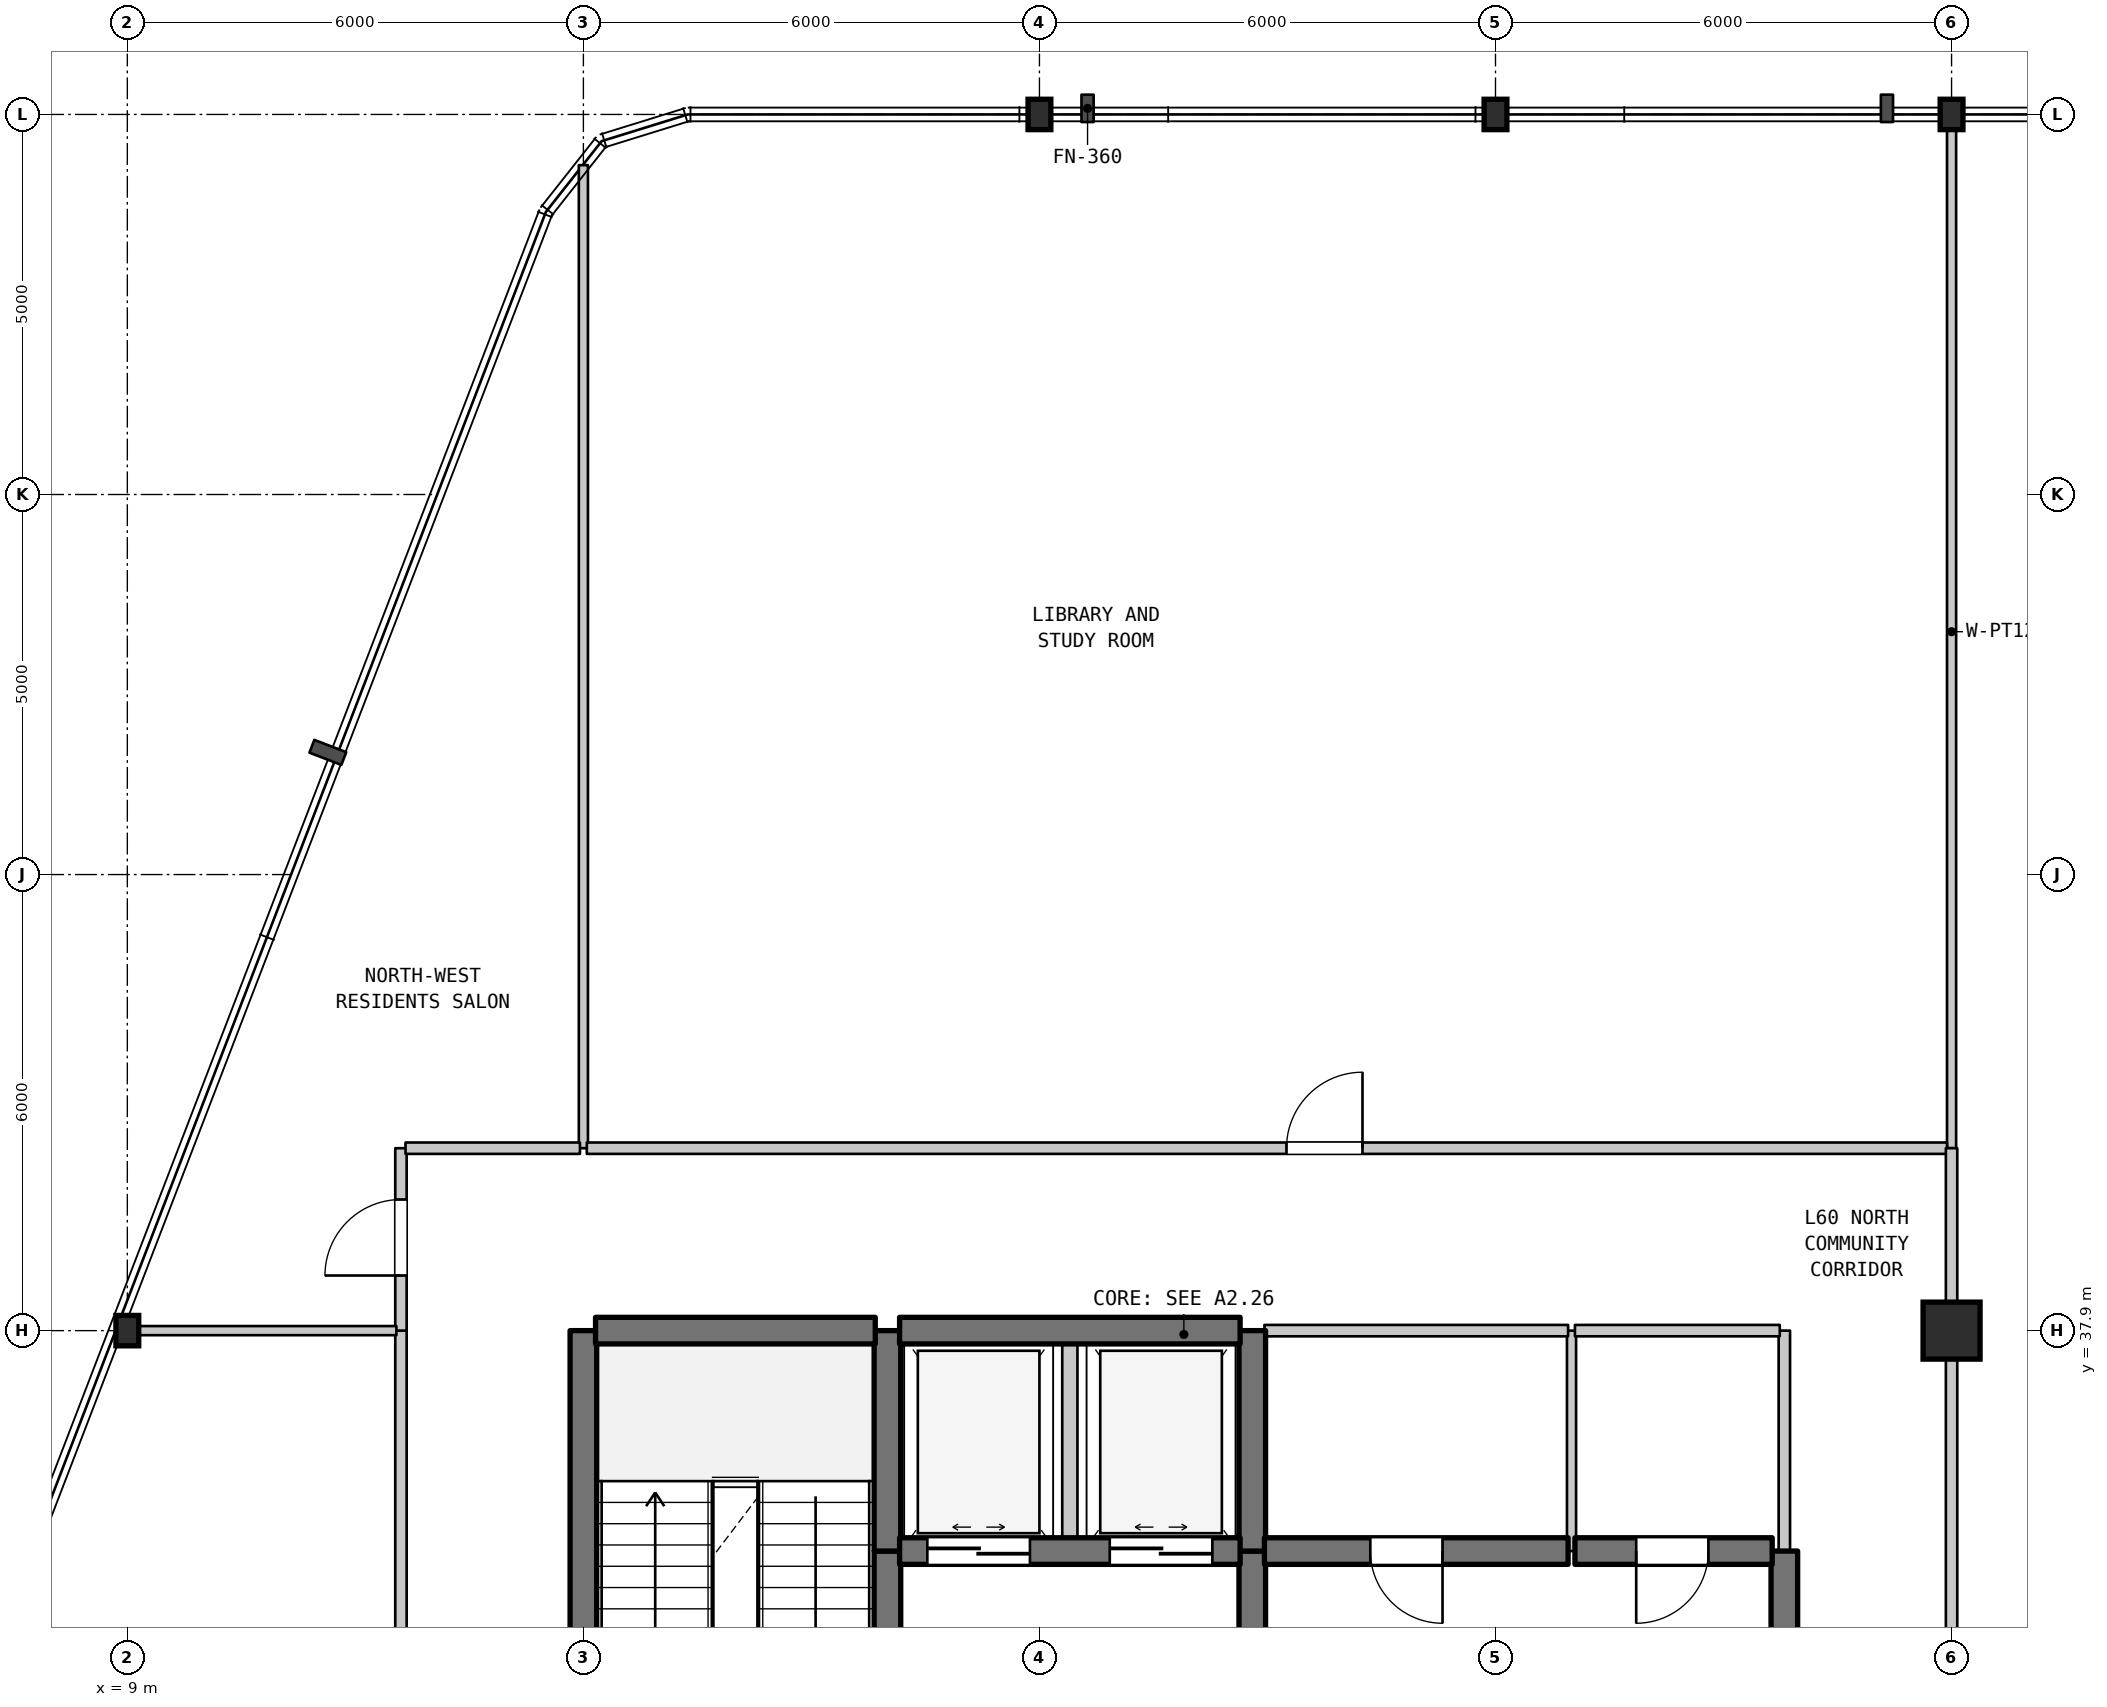
"""IFC4 building model, lengths in metres.
Left out: names, types, materials, properties, quantities, classifications, styles, units other than length and angle.
Written with IfcOpenShell. Run it as: python <this file> out.ifc"""

import sys

from ifc_helpers import new_model, si_unit, direction, frame, frame_2d, origin, origin_2d, place, context, subcontext, project, spatial, rectangle, i_section, extrude, element, fill, save


model = new_model("IFC4")
c1 = context("Model", 3, precision=1e-05, world=origin(), true_north=direction((0.0, 1.0)))
c2 = subcontext(c1, "Body", "Model", "MODEL_VIEW")
j1 = project(units=[si_unit("LENGTHUNIT", "METRE"), si_unit("PLANEANGLEUNIT", "RADIAN")], contexts=[c1])
p1 = place(None, origin())
s1 = spatial("IfcSite", under=j1, at=p1, CompositionType="ELEMENT")
p2 = place(p1, origin())
s2 = spatial("IfcBuilding", under=s1, at=p2, CompositionType="ELEMENT")
p3 = place(p2, frame((0.0, 0.0, 242.8)))
s3 = spatial("IfcBuildingStorey", under=s2, at=p3, CompositionType="ELEMENT", Elevation=242.8)
for number, where, z_axis, x_axis in (
    (1, (9.0, 37.9, 0.0), (0.0, 0.0, 1.0), (1.0, 0.0, 0.0)),
    (2, (21.0, 53.9, 0.0), (0.0, 0.0, 1.0), (1.0, 0.0, 0.0)),
    (3, (27.0, 53.9, 0.0), (0.0, 0.0, 1.0), (1.0, 0.0, 0.0)),
):
    element("IfcColumn", number, at=place(p3, frame(where, z_axis=z_axis, x_axis=x_axis)), inside=s3, PredefinedType="COLUMN", context=c2, shape_type="SweptSolid", body=[
        extrude(i_section(OverallWidth=0.3, OverallDepth=0.4, WebThickness=0.013, FlangeThickness=0.024, FilletRadius=0.027, at=origin_2d()), origin(), (0.0, 0.0, 1.0), 4.5),
    ])
p4 = place(p3, frame((33.0, 37.9, 0.0), z_axis=(0.0, 0.0, 1.0), x_axis=(1.0, 0.0, 0.0)))
e4 = element("IfcColumn", 4, at=p4, inside=s3, PredefinedType="COLUMN", context=c2, shape_type="SweptSolid", body=[
    extrude(rectangle(XDim=0.75, YDim=0.75, at=origin_2d()), origin(), (0.0, 0.0, 1.0), 4.5),
])
p5 = place(p3, frame((33.0, 53.9, 0.0), z_axis=(0.0, 0.0, 1.0), x_axis=(1.0, 0.0, 0.0)))
e5 = element("IfcColumn", 5, at=p5, inside=s3, PredefinedType="COLUMN", context=c2, shape_type="SweptSolid", body=[
    extrude(i_section(OverallWidth=0.3, OverallDepth=0.4, WebThickness=0.013, FlangeThickness=0.024, FilletRadius=0.027, at=origin_2d()), origin(), (0.0, 0.0, 1.0), 4.5),
])
p6 = place(p3, frame((12.6, 17.9, 0.0), z_axis=(0.0, 0.0, 1.0), x_axis=(0.0, 1.0, 0.0)))
e6 = element("IfcWall", 6, at=p6, inside=s3, PredefinedType="STANDARD", context=c2, shape_type="SweptSolid", body=[
    extrude(rectangle(XDim=20.0, YDim=0.15, at=frame_2d((10.0, 0.0))), origin(), (0.0, 0.0, 1.0), 4.19),
])
p7 = place(p6, frame((9.1, 0.0, 0.0)))
e7 = element("IfcOpeningElement", 7, at=p7, cuts=e6, PredefinedType="OPENING", context=c2, shape_type="SweptSolid", body=[
    extrude(rectangle(XDim=1.0, YDim=2.15, at=frame_2d((0.5, 1.075))), frame((0.0, 0.085, 0.0), z_axis=(0.0, -1.0, 0.0), x_axis=(1.0, 0.0, 0.0)), (0.0, 0.0, 1.0), 0.17),
])
p8 = place(p3, frame((12.6, 37.9, 0.0), z_axis=(0.0, 0.0, 1.0), x_axis=(0.0, 1.0, 0.0)))
e8 = element("IfcWall", 8, at=p8, inside=s3, PredefinedType="STANDARD", context=c2, shape_type="SweptSolid", body=[
    extrude(rectangle(XDim=2.4, YDim=0.15, at=frame_2d((1.2, 0.0))), origin(), (0.0, 0.0, 1.0), 4.19),
])
p9 = place(p8, frame((0.725, 0.0, 0.0)))
e9 = element("IfcOpeningElement", 9, at=p9, cuts=e8, PredefinedType="OPENING", context=c2, shape_type="SweptSolid", body=[
    extrude(rectangle(XDim=1.0, YDim=2.15, at=frame_2d((0.5, 1.075))), frame((0.0, 0.085, 0.0), z_axis=(0.0, -1.0, 0.0), x_axis=(1.0, 0.0, 0.0)), (0.0, 0.0, 1.0), 0.17),
])
p10 = place(p3, frame((15.0, 31.1, 0.0), z_axis=(0.0, 0.0, 1.0), x_axis=(0.0, 1.0, 0.0)))
e10 = element("IfcWall", 10, at=p10, inside=s3, PredefinedType="SHEAR", context=c2, shape_type="SweptSolid", body=[
    extrude(rectangle(XDim=6.8, YDim=0.35, at=frame_2d((3.4, 0.0))), origin(), (0.0, 0.0, 1.0), 4.19),
])
p11 = place(p3, frame((15.0, 40.3, 0.0), z_axis=(0.0, 0.0, 1.0), x_axis=(0.0, 1.0, 0.0)))
e11 = element("IfcWall", 11, at=p11, inside=s3, PredefinedType="PARTITIONING", context=c2, shape_type="SweptSolid", body=[
    extrude(rectangle(XDim=12.933, YDim=0.12, at=frame_2d((6.466, 0.0))), origin(), (0.0, 0.0, 1.0), 4.19),
])
p12 = place(p3, frame((19.0, 29.5, 0.0), z_axis=(0.0, 0.0, 1.0), x_axis=(0.0, 1.0, 0.0)))
e12 = element("IfcWall", 12, at=p12, inside=s3, PredefinedType="SHEAR", context=c2, shape_type="SweptSolid", body=[
    extrude(rectangle(XDim=5.5, YDim=0.35, at=frame_2d((2.75, 0.0))), origin(), (0.0, 0.0, 1.0), 4.19),
])
p13 = place(p12, frame((2.025, 0.0, 0.0)))
e13 = element("IfcOpeningElement", 13, at=p13, cuts=e12, PredefinedType="OPENING", context=c2, shape_type="SweptSolid", body=[
    extrude(rectangle(XDim=1.1, YDim=2.15, at=frame_2d((0.55, 1.075))), frame((0.0, 0.185, 0.0), z_axis=(0.0, -1.0, 0.0), x_axis=(1.0, 0.0, 0.0)), (0.0, 0.0, 1.0), 0.37),
])
p14 = place(p3, frame((19.0, 35.0, 0.0), z_axis=(0.0, 0.0, 1.0), x_axis=(0.0, 1.0, 0.0)))
e14 = element("IfcWall", 14, at=p14, inside=s3, PredefinedType="SHEAR", context=c2, shape_type="SweptSolid", body=[
    extrude(rectangle(XDim=2.9, YDim=0.35, at=frame_2d((1.45, 0.0))), origin(), (0.0, 0.0, 1.0), 4.19),
])
p15 = place(p3, frame((21.4, 35.0, 0.0), z_axis=(0.0, 0.0, 1.0), x_axis=(0.0, 1.0, 0.0)))
e15 = element("IfcWall", 15, at=p15, inside=s3, PredefinedType="STANDARD", context=c2, shape_type="SweptSolid", body=[
    extrude(rectangle(XDim=2.9, YDim=0.2, at=frame_2d((1.45, 0.0))), origin(), (0.0, 0.0, 1.0), 4.19),
])
p16 = place(p3, frame((23.8, 31.5, 0.0), z_axis=(0.0, 0.0, 1.0), x_axis=(0.0, 1.0, 0.0)))
e16 = element("IfcWall", 16, at=p16, inside=s3, PredefinedType="SHEAR", context=c2, shape_type="SweptSolid", body=[
    extrude(rectangle(XDim=3.5, YDim=0.35, at=frame_2d((1.75, 0.0))), origin(), (0.0, 0.0, 1.0), 4.19),
])
p17 = place(p16, frame((1.127, 0.0, 0.0)))
e17 = element("IfcOpeningElement", 17, at=p17, cuts=e16, PredefinedType="OPENING", context=c2, shape_type="SweptSolid", body=[
    extrude(rectangle(XDim=1.1, YDim=2.15, at=frame_2d((0.55, 1.075))), frame((0.0, 0.185, 0.0), z_axis=(0.0, -1.0, 0.0), x_axis=(1.0, 0.0, 0.0)), (0.0, 0.0, 1.0), 0.37),
])
p18 = place(p3, frame((23.8, 35.0, 0.0), z_axis=(0.0, 0.0, 1.0), x_axis=(0.0, 1.0, 0.0)))
e18 = element("IfcWall", 18, at=p18, inside=s3, PredefinedType="SHEAR", context=c2, shape_type="SweptSolid", body=[
    extrude(rectangle(XDim=2.9, YDim=0.35, at=frame_2d((1.45, 0.0))), origin(), (0.0, 0.0, 1.0), 4.19),
])
p19 = place(p3, frame((28.0, 35.0, 0.0), z_axis=(0.0, 0.0, 1.0), x_axis=(0.0, 1.0, 0.0)))
e19 = element("IfcWall", 19, at=p19, inside=s3, PredefinedType="PARTITIONING", context=c2, shape_type="SweptSolid", body=[
    extrude(rectangle(XDim=2.9, YDim=0.12, at=frame_2d((1.45, 0.0))), origin(), (0.0, 0.0, 1.0), 4.19),
])
p20 = place(p3, frame((30.8, 31.5, 0.0), z_axis=(0.0, 0.0, 1.0), x_axis=(0.0, 1.0, 0.0)))
e20 = element("IfcWall", 20, at=p20, inside=s3, PredefinedType="SHEAR", context=c2, shape_type="SweptSolid", body=[
    extrude(rectangle(XDim=3.5, YDim=0.35, at=frame_2d((1.75, 0.0))), origin(), (0.0, 0.0, 1.0), 4.19),
])
p21 = place(p20, frame((1.15, 0.0, 0.0)))
e21 = element("IfcOpeningElement", 21, at=p21, cuts=e20, PredefinedType="OPENING", context=c2, shape_type="SweptSolid", body=[
    extrude(rectangle(XDim=1.2, YDim=2.2, at=frame_2d((0.6, 1.1))), frame((0.0, 0.185, 0.0), z_axis=(0.0, -1.0, 0.0), x_axis=(1.0, 0.0, 0.0)), (0.0, 0.0, 1.0), 0.37),
])
p22 = place(p3, frame((30.8, 35.0, 0.0), z_axis=(0.0, 0.0, 1.0), x_axis=(0.0, 1.0, 0.0)))
e22 = element("IfcWall", 22, at=p22, inside=s3, PredefinedType="STANDARD", context=c2, shape_type="SweptSolid", body=[
    extrude(rectangle(XDim=2.9, YDim=0.15, at=frame_2d((1.45, 0.0))), origin(), (0.0, 0.0, 1.0), 4.19),
])
p23 = place(p3, frame((33.0, 27.9, 0.0), z_axis=(0.0, 0.0, 1.0), x_axis=(0.0, 1.0, 0.0)))
e23 = element("IfcWall", 23, at=p23, inside=s3, PredefinedType="STANDARD", context=c2, shape_type="SweptSolid", body=[
    extrude(rectangle(XDim=10.0, YDim=0.15, at=frame_2d((5.0, 0.0))), origin(), (0.0, 0.0, 1.0), 3.69),
])
p24 = place(p3, frame((33.0, 40.3, 0.0), z_axis=(0.0, 0.0, 1.0), x_axis=(0.0, 1.0, 0.0)))
e24 = element("IfcWall", 24, at=p24, inside=s3, PredefinedType="PARTITIONING", context=c2, shape_type="SweptSolid", body=[
    extrude(rectangle(XDim=13.59, YDim=0.12, at=frame_2d((6.795, 0.0))), origin(), (0.0, 0.0, 1.0), 3.59),
])
p25 = place(p3, frame((19.16, 35.0, 0.0), z_axis=(0.0, 0.0, 1.0), x_axis=(1.0, 0.0, 0.0)))
e25 = element("IfcWall", 25, at=p25, inside=s3, PredefinedType="SHEAR", context=c2, shape_type="SweptSolid", body=[
    extrude(rectangle(XDim=4.48, YDim=0.35, at=frame_2d((2.24, 0.0))), origin(), (0.0, 0.0, 1.0), 4.19),
])
p26 = place(p25, frame((0.365, 0.0, 0.0)))
e26 = element("IfcOpeningElement", 26, at=p26, cuts=e25, PredefinedType="OPENING", context=c2, shape_type="SweptSolid", body=[
    extrude(rectangle(XDim=1.35, YDim=2.2, at=frame_2d((0.675, 1.1))), frame((0.0, 0.185, 0.0), z_axis=(0.0, -1.0, 0.0), x_axis=(1.0, 0.0, 0.0)), (0.0, 0.0, 1.0), 0.37),
])
p27 = place(p25, frame((2.765, 0.0, 0.0)))
e27 = element("IfcOpeningElement", 27, at=p27, cuts=e25, PredefinedType="OPENING", context=c2, shape_type="SweptSolid", body=[
    extrude(rectangle(XDim=1.35, YDim=2.2, at=frame_2d((0.675, 1.1))), frame((0.0, 0.185, 0.0), z_axis=(0.0, -1.0, 0.0), x_axis=(1.0, 0.0, 0.0)), (0.0, 0.0, 1.0), 0.37),
])
p28 = place(p3, frame((23.96, 35.0, 0.0), z_axis=(0.0, 0.0, 1.0), x_axis=(1.0, 0.0, 0.0)))
e28 = element("IfcWall", 28, at=p28, inside=s3, PredefinedType="SHEAR", context=c2, shape_type="SweptSolid", body=[
    extrude(rectangle(XDim=3.995, YDim=0.35, at=frame_2d((1.998, 0.0))), origin(), (0.0, 0.0, 1.0), 4.19),
])
p29 = place(p28, frame((1.393, 0.0, 0.0)))
e29 = element("IfcOpeningElement", 29, at=p29, cuts=e28, PredefinedType="OPENING", context=c2, shape_type="SweptSolid", body=[
    extrude(rectangle(XDim=0.95, YDim=2.15, at=frame_2d((0.475, 1.075))), frame((0.0, 0.185, 0.0), z_axis=(0.0, -1.0, 0.0), x_axis=(1.0, 0.0, 0.0)), (0.0, 0.0, 1.0), 0.37),
])
p30 = place(p3, frame((28.045, 35.0, 0.0), z_axis=(0.0, 0.0, 1.0), x_axis=(1.0, 0.0, 0.0)))
e30 = element("IfcWall", 30, at=p30, inside=s3, PredefinedType="SHEAR", context=c2, shape_type="SweptSolid", body=[
    extrude(rectangle(XDim=2.595, YDim=0.35, at=frame_2d((1.297, 0.0))), origin(), (0.0, 0.0, 1.0), 4.19),
])
p31 = place(p30, frame((0.806, 0.0, 0.0)))
e31 = element("IfcOpeningElement", 31, at=p31, cuts=e30, PredefinedType="OPENING", context=c2, shape_type="SweptSolid", body=[
    extrude(rectangle(XDim=0.95, YDim=2.15, at=frame_2d((0.475, 1.075))), frame((0.0, 0.185, 0.0), z_axis=(0.0, -1.0, 0.0), x_axis=(1.0, 0.0, 0.0)), (0.0, 0.0, 1.0), 0.37),
])
p32 = place(p3, frame((8.856, 37.9, 0.0), z_axis=(0.0, 0.0, 1.0), x_axis=(1.0, 0.0, 0.0)))
e32 = element("IfcWall", 32, at=p32, inside=s3, PredefinedType="PARTITIONING", context=c2, shape_type="SweptSolid", body=[
    extrude(rectangle(XDim=3.684, YDim=0.12, at=frame_2d((1.842, 0.0))), origin(), (0.0, 0.0, 1.0), 3.84),
])
p33 = place(p3, frame((15.16, 37.9, 0.0), z_axis=(0.0, 0.0, 1.0), x_axis=(1.0, 0.0, 0.0)))
e33 = element("IfcWall", 33, at=p33, inside=s3, PredefinedType="SHEAR", context=c2, shape_type="SweptSolid", body=[
    extrude(rectangle(XDim=3.68, YDim=0.35, at=frame_2d((1.84, 0.0))), origin(), (0.0, 0.0, 1.0), 4.19),
])
p34 = place(p3, frame((19.16, 37.9, 0.0), z_axis=(0.0, 0.0, 1.0), x_axis=(1.0, 0.0, 0.0)))
e34 = element("IfcWall", 34, at=p34, inside=s3, PredefinedType="SHEAR", context=c2, shape_type="SweptSolid", body=[
    extrude(rectangle(XDim=4.48, YDim=0.35, at=frame_2d((2.24, 0.0))), origin(), (0.0, 0.0, 1.0), 4.19),
])
p35 = place(p3, frame((23.96, 37.9, 0.0), z_axis=(0.0, 0.0, 1.0), x_axis=(1.0, 0.0, 0.0)))
e35 = element("IfcWall", 35, at=p35, inside=s3, PredefinedType="STANDARD", context=c2, shape_type="SweptSolid", body=[
    extrude(rectangle(XDim=3.995, YDim=0.15, at=frame_2d((1.998, 0.0))), origin(), (0.0, 0.0, 1.0), 3.69),
])
p36 = place(p3, frame((28.045, 37.9, 0.0), z_axis=(0.0, 0.0, 1.0), x_axis=(1.0, 0.0, 0.0)))
e36 = element("IfcWall", 36, at=p36, inside=s3, PredefinedType="STANDARD", context=c2, shape_type="SweptSolid", body=[
    extrude(rectangle(XDim=2.695, YDim=0.15, at=frame_2d((1.348, 0.0))), origin(), (0.0, 0.0, 1.0), 3.69),
])
p37 = place(p3, frame((12.66, 40.3, 0.0), z_axis=(0.0, 0.0, 1.0), x_axis=(1.0, 0.0, 0.0)))
e37 = element("IfcWall", 37, at=p37, inside=s3, PredefinedType="STANDARD", context=c2, shape_type="SweptSolid", body=[
    extrude(rectangle(XDim=2.295, YDim=0.15, at=frame_2d((1.147, 0.0))), origin(), (0.0, 0.0, 1.0), 4.19),
])
p38 = place(p3, frame((15.045, 40.3, 0.0), z_axis=(0.0, 0.0, 1.0), x_axis=(1.0, 0.0, 0.0)))
e38 = element("IfcWall", 38, at=p38, inside=s3, PredefinedType="STANDARD", context=c2, shape_type="SweptSolid", body=[
    extrude(rectangle(XDim=17.895, YDim=0.15, at=frame_2d((8.948, 0.0))), origin(), (0.0, 0.0, 1.0), 4.19),
])
p39 = place(p38, frame((9.205, 0.0, 0.0)))
e39 = element("IfcOpeningElement", 39, at=p39, cuts=e38, PredefinedType="OPENING", context=c2, shape_type="SweptSolid", body=[
    extrude(rectangle(XDim=1.0, YDim=2.15, at=frame_2d((0.5, 1.075))), frame((0.0, 0.085, 0.0), z_axis=(0.0, -1.0, 0.0), x_axis=(1.0, 0.0, 0.0)), (0.0, 0.0, 1.0), 0.17),
])
p40 = place(p3, frame((33.0, 37.9, 0.0), z_axis=(0.0, 0.0, 1.0), x_axis=(0.0, 1.0, 0.0)))
e40 = element("IfcWall", 40, at=p40, inside=s3, PredefinedType="STANDARD", context=c2, shape_type="SweptSolid", body=[
    extrude(rectangle(XDim=2.4, YDim=0.15, at=frame_2d((1.2, 0.0))), origin(), (0.0, 0.0, 1.0), 3.59),
])
p41 = place(p9, origin())
e41 = element("IfcDoor", 41, at=p41, inside=s3, OperationType="SINGLE_SWING_LEFT", PredefinedType="DOOR", context=c2, shape_type="SweptSolid", body=[
    extrude(rectangle(XDim=1.0, YDim=2.15, at=frame_2d((0.5, 1.075))), frame((0.0, 0.025, 0.0), z_axis=(0.0, -1.0, 0.0), x_axis=(1.0, 0.0, 0.0)), (0.0, 0.0, 1.0), 0.05),
])
fill(e9, e41)
p42 = place(p26, origin())
e42 = element("IfcDoor", 42, at=p42, inside=s3, OperationType="DOUBLE_DOOR_SLIDING", PredefinedType="DOOR", context=c2, shape_type="SweptSolid", body=[
    extrude(rectangle(XDim=1.35, YDim=2.2, at=frame_2d((0.675, 1.1))), frame((0.0, 0.025, 0.0), z_axis=(0.0, -1.0, 0.0), x_axis=(1.0, 0.0, 0.0)), (0.0, 0.0, 1.0), 0.05),
])
fill(e26, e42)
p43 = place(p27, origin())
e43 = element("IfcDoor", 43, at=p43, inside=s3, OperationType="DOUBLE_DOOR_SLIDING", PredefinedType="DOOR", context=c2, shape_type="SweptSolid", body=[
    extrude(rectangle(XDim=1.35, YDim=2.2, at=frame_2d((0.675, 1.1))), frame((0.0, 0.025, 0.0), z_axis=(0.0, -1.0, 0.0), x_axis=(1.0, 0.0, 0.0)), (0.0, 0.0, 1.0), 0.05),
])
fill(e27, e43)
p44 = place(p29, frame((0.95, 0.0, 0.0), z_axis=(0.0, 0.0, 1.0), x_axis=(-1.0, 0.0, 0.0)))
e44 = element("IfcDoor", 44, at=p44, inside=s3, OperationType="SINGLE_SWING_RIGHT", PredefinedType="DOOR", context=c2, shape_type="SweptSolid", body=[
    extrude(rectangle(XDim=0.95, YDim=2.15, at=frame_2d((0.475, 1.075))), frame((0.0, 0.025, 0.0), z_axis=(0.0, -1.0, 0.0), x_axis=(1.0, 0.0, 0.0)), (0.0, 0.0, 1.0), 0.05),
])
fill(e29, e44)
p45 = place(p31, frame((0.95, 0.0, 0.0), z_axis=(0.0, 0.0, 1.0), x_axis=(-1.0, 0.0, 0.0)))
e45 = element("IfcDoor", 45, at=p45, inside=s3, OperationType="SINGLE_SWING_LEFT", PredefinedType="DOOR", context=c2, shape_type="SweptSolid", body=[
    extrude(rectangle(XDim=0.95, YDim=2.15, at=frame_2d((0.475, 1.075))), frame((0.0, 0.025, 0.0), z_axis=(0.0, -1.0, 0.0), x_axis=(1.0, 0.0, 0.0)), (0.0, 0.0, 1.0), 0.05),
])
fill(e31, e45)
p46 = place(p39, origin())
e46 = element("IfcDoor", 46, at=p46, inside=s3, OperationType="SINGLE_SWING_RIGHT", PredefinedType="DOOR", context=c2, shape_type="SweptSolid", body=[
    extrude(rectangle(XDim=1.0, YDim=2.15, at=frame_2d((0.5, 1.075))), frame((0.0, 0.025, 0.0), z_axis=(0.0, -1.0, 0.0), x_axis=(1.0, 0.0, 0.0)), (0.0, 0.0, 1.0), 0.05),
])
fill(e39, e46)
save(model, sys.argv[1])
